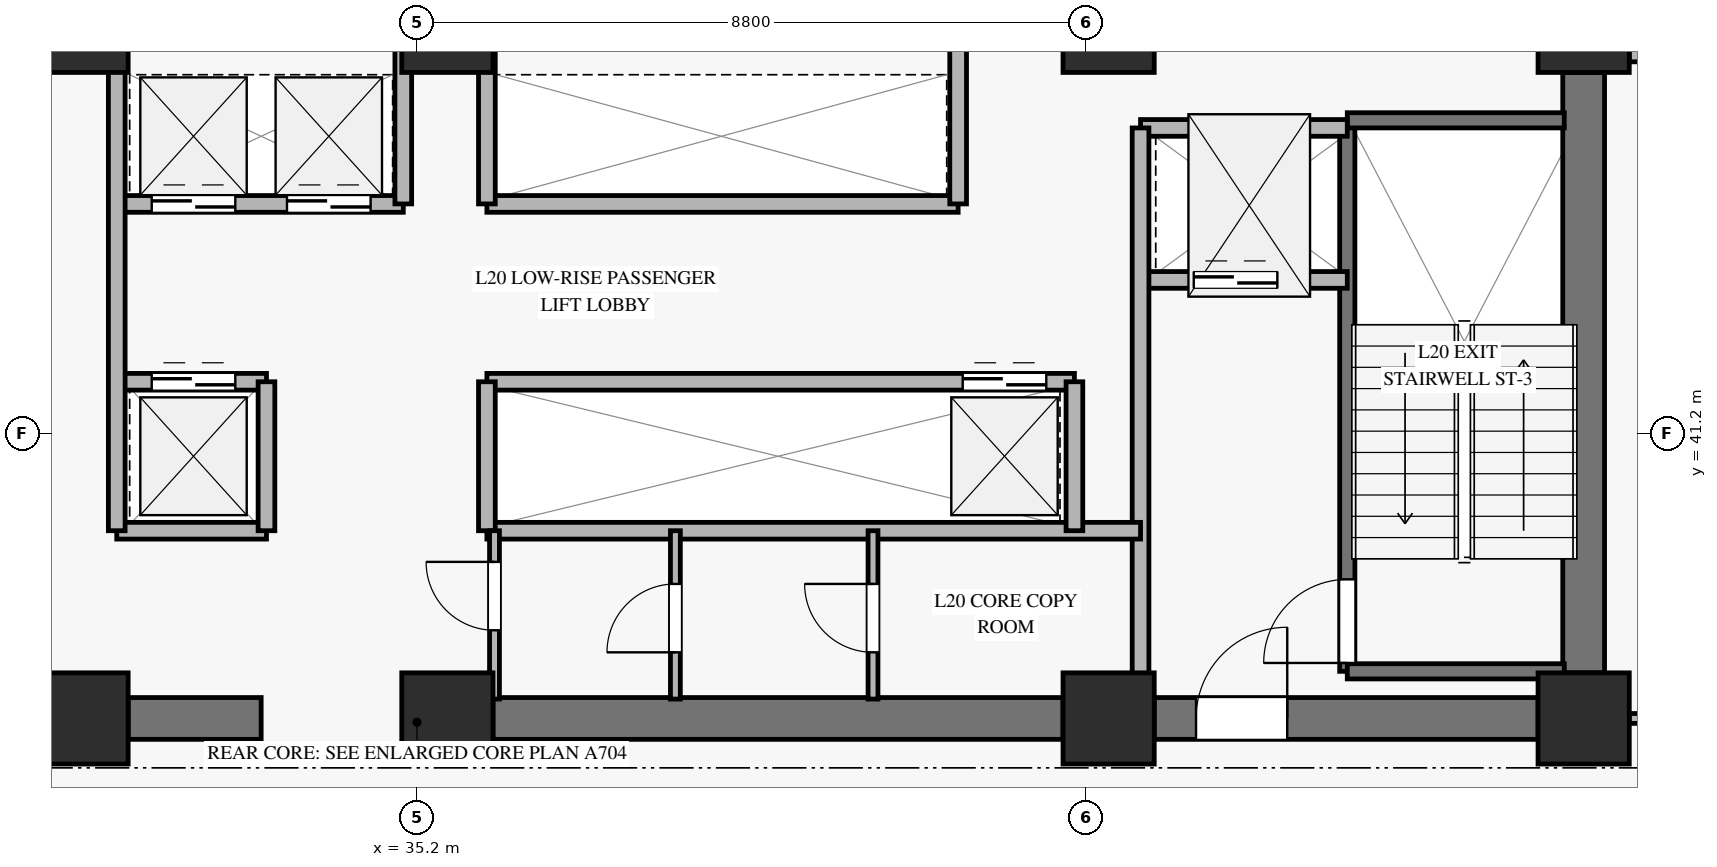
"""IFC4 building model, lengths in metres.
Left out: names, types, materials, properties, quantities, classifications, styles, units other than length and angle.
Written with IfcOpenShell. Run it as: python <this file> out.ifc"""

import sys

from ifc_helpers import new_model, si_unit, direction, frame, frame_2d, origin, origin_2d, place, context, subcontext, project, spatial, rectangle, extrude, source, transform, mapped, element, fill, save


model = new_model("IFC4")
c1 = context("Model", 3, precision=1e-05, world=origin(), true_north=direction((0.0, 1.0)))
c2 = subcontext(c1, "Body", "Model", "MODEL_VIEW")
j1 = project(units=[si_unit("LENGTHUNIT", "METRE"), si_unit("PLANEANGLEUNIT", "RADIAN")], contexts=[c1])
p1 = place(None, origin())
s1 = spatial("IfcSite", under=j1, at=p1, CompositionType="ELEMENT")
p2 = place(p1, origin())
s2 = spatial("IfcBuilding", under=s1, at=p2, CompositionType="ELEMENT")
p3 = place(p2, frame((0.0, 0.0, 83.5)))
s3 = spatial("IfcBuildingStorey", under=s2, at=p3, CompositionType="ELEMENT", Elevation=83.5)
m1 = source(origin(), c2, "Body", "SweptSolid", [
    extrude(rectangle(XDim=1.2, YDim=1.2, at=origin_2d()), origin(), (0.0, 0.0, 1.0), 3.68),
])
for number, where, z_axis, x_axis in (
    (1, (30.8, 37.45, 0.0), (0.0, 0.0, 1.0), (1.0, 0.0, 0.0)),
    (2, (30.8, 46.55, 0.0), (0.0, 0.0, 1.0), (1.0, 0.0, 0.0)),
    (3, (35.6, 37.45, 0.0), (0.0, 0.0, 1.0), (1.0, 0.0, 0.0)),
    (4, (35.6, 46.55, 0.0), (0.0, 0.0, 1.0), (1.0, 0.0, 0.0)),
    (5, (44.3, 37.45, 0.0), (0.0, 0.0, 1.0), (1.0, 0.0, 0.0)),
    (6, (44.3, 46.55, 0.0), (0.0, 0.0, 1.0), (1.0, 0.0, 0.0)),
    (7, (50.55, 37.45, 0.0), (0.0, 0.0, 1.0), (1.0, 0.0, 0.0)),
    (8, (50.55, 46.55, 0.0), (0.0, 0.0, 1.0), (1.0, 0.0, 0.0)),
):
    element("IfcColumn", number, at=place(p3, frame(where, z_axis=z_axis, x_axis=x_axis)), inside=s3, PredefinedType="PILASTER", context=c2, shape_type="MappedRepresentation", body=[
        mapped(m1, transform((0.0, 0.0, 0.0), x_axis=(1.0, 0.0, 0.0), y_axis=(0.0, 1.0, 0.0), z_axis=(0.0, 0.0, 1.0), scale=1.0)),
    ])
p4 = place(p3, frame((31.4, 37.45, 0.0), z_axis=(0.0, 0.0, 1.0), x_axis=(1.0, 0.0, 0.0)))
e9 = element("IfcWall", 9, at=p4, inside=s3, PredefinedType="SHEAR", context=c2, shape_type="SweptSolid", body=[
    extrude(rectangle(XDim=1.75, YDim=0.55, at=frame_2d((0.875, 0.0))), origin(), (0.0, 0.0, 1.0), 3.68),
])
p5 = place(p3, frame((36.2, 37.45, 0.0), z_axis=(0.0, 0.0, 1.0), x_axis=(1.0, 0.0, 0.0)))
e10 = element("IfcWall", 10, at=p5, inside=s3, PredefinedType="SHEAR", context=c2, shape_type="SweptSolid", body=[
    extrude(rectangle(XDim=7.5, YDim=0.55, at=frame_2d((3.75, 0.0))), origin(), (0.0, 0.0, 1.0), 3.68),
])
p6 = place(p3, frame((44.9, 37.45, 0.0), z_axis=(0.0, 0.0, 1.0), x_axis=(1.0, 0.0, 0.0)))
e11 = element("IfcWall", 11, at=p6, inside=s3, PredefinedType="SHEAR", context=c2, shape_type="SweptSolid", body=[
    extrude(rectangle(XDim=5.05, YDim=0.55, at=frame_2d((2.525, 0.0))), origin(), (0.0, 0.0, 1.0), 3.68),
])
p7 = place(p6, frame((0.55, 0.0, 0.0)))
e12 = element("IfcOpeningElement", 12, at=p7, cuts=e11, PredefinedType="OPENING", context=c2, shape_type="SweptSolid", body=[
    extrude(rectangle(XDim=1.2, YDim=2.15, at=frame_2d((0.6, 1.075))), frame((0.0, 0.285, 0.0), z_axis=(0.0, -1.0, 0.0), x_axis=(1.0, 0.0, 0.0)), (0.0, 0.0, 1.0), 0.57),
])
p8 = place(p3, frame((50.55, 38.05, 0.0), z_axis=(0.0, 0.0, 1.0), x_axis=(0.0, 1.0, 0.0)))
e13 = element("IfcWall", 13, at=p8, inside=s3, PredefinedType="SHEAR", context=c2, shape_type="SweptSolid", body=[
    extrude(rectangle(XDim=7.9, YDim=0.55, at=frame_2d((3.95, 0.0))), origin(), (0.0, 0.0, 1.0), 3.68),
])
p9 = place(p3, frame((51.15, 46.25, 0.0), z_axis=(0.0, 0.0, 1.0), x_axis=(1.0, 0.0, 0.0)))
e14 = element("IfcWall", 14, at=p9, inside=s3, PredefinedType="SOLIDWALL", context=c2, shape_type="SweptSolid", body=[
    extrude(rectangle(XDim=11.615, YDim=0.32, at=frame_2d((5.808, 0.0))), origin(), (0.0, 0.0, 1.0), 3.16),
])
p10 = place(p9, frame((5.008, 0.0, 0.45)))
e15 = element("IfcOpeningElement", 15, at=p10, cuts=e14, PredefinedType="OPENING", context=c2, shape_type="SweptSolid", body=[
    extrude(rectangle(XDim=1.6, YDim=2.0, at=frame_2d((0.8, 1.0))), frame((0.0, 0.17, 0.0), z_axis=(0.0, -1.0, 0.0), x_axis=(1.0, 0.0, 0.0)), (0.0, 0.0, 1.0), 0.34),
])
p11 = place(p3, frame((47.44, 38.07, 0.0), z_axis=(0.0, 0.0, 1.0), x_axis=(0.0, 1.0, 0.0)))
e16 = element("IfcWall", 16, at=p11, inside=s3, PredefinedType="SOLIDWALL", context=c2, shape_type="SweptSolid", body=[
    extrude(rectangle(XDim=7.25, YDim=0.2, at=frame_2d((3.625, 0.0))), origin(), (0.0, 0.0, 1.0), 3.9),
])
p12 = place(p11, frame((0.11, 0.0, 0.0)))
e17 = element("IfcOpeningElement", 17, at=p12, cuts=e16, PredefinedType="OPENING", context=c2, shape_type="SweptSolid", body=[
    extrude(rectangle(XDim=1.1, YDim=2.15, at=frame_2d((0.55, 1.075))), frame((0.0, 0.11, 0.0), z_axis=(0.0, -1.0, 0.0), x_axis=(1.0, 0.0, 0.0)), (0.0, 0.0, 1.0), 0.22),
])
for number, where, z_axis, x_axis in (
    (18, (47.44, 45.32, 0.0), (0.0, 0.0, 1.0), (1.0, 0.0, 0.0)),
    (19, (47.44, 38.07, 0.0), (0.0, 0.0, 1.0), (1.0, 0.0, 0.0)),
):
    element("IfcWall", number, at=place(p3, frame(where, z_axis=z_axis, x_axis=x_axis)), inside=s3, PredefinedType="SOLIDWALL", context=c2, shape_type="SweptSolid", body=[
        extrude(rectangle(XDim=2.855, YDim=0.2, at=frame_2d((1.427, 0.0))), origin(), (0.0, 0.0, 1.0), 3.9),
    ])
p13 = place(p3, frame((44.72, 43.22, 0.0), z_axis=(0.0, 0.0, 1.0), x_axis=(1.0, 0.0, 0.0)))
e20 = element("IfcWall", 20, at=p13, inside=s3, PredefinedType="SOLIDWALL", context=c2, shape_type="SweptSolid", body=[
    extrude(rectangle(XDim=2.72, YDim=0.22, at=frame_2d((1.36, 0.0))), origin(), (0.0, 0.0, 1.0), 3.68),
])
p14 = place(p13, frame((0.7, 0.0, 0.0)))
e21 = element("IfcOpeningElement", 21, at=p14, cuts=e20, PredefinedType="OPENING", context=c2, shape_type="SweptSolid", body=[
    extrude(rectangle(XDim=1.1, YDim=2.2, at=frame_2d((0.55, 1.1))), frame((0.0, 0.12, 0.0), z_axis=(0.0, -1.0, 0.0), x_axis=(1.0, 0.0, 0.0)), (0.0, 0.0, 1.0), 0.24),
])
p15 = place(p3, frame((44.72, 45.22, 0.0), z_axis=(0.0, 0.0, 1.0), x_axis=(1.0, 0.0, 0.0)))
e22 = element("IfcWall", 22, at=p15, inside=s3, PredefinedType="SOLIDWALL", context=c2, shape_type="SweptSolid", body=[
    extrude(rectangle(XDim=2.72, YDim=0.22, at=frame_2d((1.36, 0.0))), origin(), (0.0, 0.0, 1.0), 3.68),
])
p16 = place(p3, frame((44.72, 37.705, 0.0), z_axis=(0.0, 0.0, 1.0), x_axis=(0.0, 1.0, 0.0)))
e23 = element("IfcWall", 23, at=p16, inside=s3, PredefinedType="SOLIDWALL", context=c2, shape_type="SweptSolid", body=[
    extrude(rectangle(XDim=7.515, YDim=0.22, at=frame_2d((3.757, 0.0))), origin(), (0.0, 0.0, 1.0), 3.68),
])
p17 = place(p3, frame((31.25, 44.22, 0.0), z_axis=(0.0, 0.0, 1.0), x_axis=(1.0, 0.0, 0.0)))
e24 = element("IfcWall", 24, at=p17, inside=s3, PredefinedType="SOLIDWALL", context=c2, shape_type="SweptSolid", body=[
    extrude(rectangle(XDim=3.77, YDim=0.22, at=frame_2d((1.885, 0.0))), origin(), (0.0, 0.0, 1.0), 3.68),
])
p18 = place(p17, frame((0.46, 0.0, 0.0)))
e25 = element("IfcOpeningElement", 25, at=p18, cuts=e24, PredefinedType="OPENING", context=c2, shape_type="SweptSolid", body=[
    extrude(rectangle(XDim=1.1, YDim=2.2, at=frame_2d((0.55, 1.1))), frame((0.0, 0.12, 0.0), z_axis=(0.0, -1.0, 0.0), x_axis=(1.0, 0.0, 0.0)), (0.0, 0.0, 1.0), 0.24),
])
p19 = place(p17, frame((2.24, 0.0, 0.0)))
e26 = element("IfcOpeningElement", 26, at=p19, cuts=e24, PredefinedType="OPENING", context=c2, shape_type="SweptSolid", body=[
    extrude(rectangle(XDim=1.1, YDim=2.2, at=frame_2d((0.55, 1.1))), frame((0.0, 0.12, 0.0), z_axis=(0.0, -1.0, 0.0), x_axis=(1.0, 0.0, 0.0)), (0.0, 0.0, 1.0), 0.24),
])
p20 = place(p3, frame((36.12, 44.22, 0.0), z_axis=(0.0, 0.0, 1.0), x_axis=(1.0, 0.0, 0.0)))
e27 = element("IfcWall", 27, at=p20, inside=s3, PredefinedType="SOLIDWALL", context=c2, shape_type="SweptSolid", body=[
    extrude(rectangle(XDim=6.2, YDim=0.22, at=frame_2d((3.1, 0.0))), origin(), (0.0, 0.0, 1.0), 3.68),
])
for number, where, z_axis, x_axis in (
    (28, (35.02, 44.22, 0.0), (0.0, 0.0, 1.0), (0.0, 1.0, 0.0)),
    (29, (36.12, 44.22, 0.0), (0.0, 0.0, 1.0), (0.0, 1.0, 0.0)),
    (30, (42.32, 44.22, 0.0), (0.0, 0.0, 1.0), (0.0, 1.0, 0.0)),
):
    element("IfcWall", number, at=place(p3, frame(where, z_axis=z_axis, x_axis=x_axis)), inside=s3, PredefinedType="SOLIDWALL", context=c2, shape_type="SweptSolid", body=[
        extrude(rectangle(XDim=2.075, YDim=0.22, at=frame_2d((1.038, 0.0))), origin(), (0.0, 0.0, 1.0), 3.68),
    ])
p21 = place(p3, frame((31.25, 41.88, 0.0), z_axis=(0.0, 0.0, 1.0), x_axis=(1.0, 0.0, 0.0)))
e31 = element("IfcWall", 31, at=p21, inside=s3, PredefinedType="SOLIDWALL", context=c2, shape_type="SweptSolid", body=[
    extrude(rectangle(XDim=1.97, YDim=0.22, at=frame_2d((0.985, 0.0))), origin(), (0.0, 0.0, 1.0), 3.68),
])
p22 = place(p21, frame((0.46, 0.0, 0.0)))
e32 = element("IfcOpeningElement", 32, at=p22, cuts=e31, PredefinedType="OPENING", context=c2, shape_type="SweptSolid", body=[
    extrude(rectangle(XDim=1.1, YDim=2.2, at=frame_2d((0.55, 1.1))), frame((0.0, 0.12, 0.0), z_axis=(0.0, -1.0, 0.0), x_axis=(1.0, 0.0, 0.0)), (0.0, 0.0, 1.0), 0.24),
])
p23 = place(p3, frame((36.12, 41.88, 0.0), z_axis=(0.0, 0.0, 1.0), x_axis=(1.0, 0.0, 0.0)))
e33 = element("IfcWall", 33, at=p23, inside=s3, PredefinedType="SOLIDWALL", context=c2, shape_type="SweptSolid", body=[
    extrude(rectangle(XDim=7.73, YDim=0.22, at=frame_2d((3.865, 0.0))), origin(), (0.0, 0.0, 1.0), 3.68),
])
p24 = place(p23, frame((6.26, 0.0, 0.0)))
e34 = element("IfcOpeningElement", 34, at=p24, cuts=e33, PredefinedType="OPENING", context=c2, shape_type="SweptSolid", body=[
    extrude(rectangle(XDim=1.1, YDim=2.2, at=frame_2d((0.55, 1.1))), frame((0.0, 0.12, 0.0), z_axis=(0.0, -1.0, 0.0), x_axis=(1.0, 0.0, 0.0)), (0.0, 0.0, 1.0), 0.24),
])
p25 = place(p3, frame((31.25, 39.92, 0.0), z_axis=(0.0, 0.0, 1.0), x_axis=(1.0, 0.0, 0.0)))
e35 = element("IfcWall", 35, at=p25, inside=s3, PredefinedType="SOLIDWALL", context=c2, shape_type="SweptSolid", body=[
    extrude(rectangle(XDim=1.97, YDim=0.22, at=frame_2d((0.985, 0.0))), origin(), (0.0, 0.0, 1.0), 3.68),
])
p26 = place(p3, frame((33.22, 39.92, 0.0), z_axis=(0.0, 0.0, 1.0), x_axis=(0.0, 1.0, 0.0)))
e36 = element("IfcWall", 36, at=p26, inside=s3, PredefinedType="SOLIDWALL", context=c2, shape_type="SweptSolid", body=[
    extrude(rectangle(XDim=1.96, YDim=0.22, at=frame_2d((0.98, 0.0))), origin(), (0.0, 0.0, 1.0), 3.68),
])
p27 = place(p3, frame((36.12, 39.92, 0.0), z_axis=(0.0, 0.0, 1.0), x_axis=(1.0, 0.0, 0.0)))
e37 = element("IfcWall", 37, at=p27, inside=s3, PredefinedType="SOLIDWALL", context=c2, shape_type="SweptSolid", body=[
    extrude(rectangle(XDim=8.6, YDim=0.22, at=frame_2d((4.3, 0.0))), origin(), (0.0, 0.0, 1.0), 2.965),
])
p28 = place(p3, frame((36.12, 39.92, 0.0), z_axis=(0.0, 0.0, 1.0), x_axis=(0.0, 1.0, 0.0)))
e38 = element("IfcWall", 38, at=p28, inside=s3, PredefinedType="SOLIDWALL", context=c2, shape_type="SweptSolid", body=[
    extrude(rectangle(XDim=1.96, YDim=0.22, at=frame_2d((0.98, 0.0))), origin(), (0.0, 0.0, 1.0), 3.68),
])
p29 = place(p3, frame((31.25, 39.92, 0.0), z_axis=(0.0, 0.0, 1.0), x_axis=(0.0, 1.0, 0.0)))
e39 = element("IfcWall", 39, at=p29, inside=s3, PredefinedType="SOLIDWALL", context=c2, shape_type="SweptSolid", body=[
    extrude(rectangle(XDim=6.375, YDim=0.22, at=frame_2d((3.188, 0.0))), origin(), (0.0, 0.0, 1.0), 3.68),
])
p30 = place(p3, frame((43.85, 39.92, 0.0), z_axis=(0.0, 0.0, 1.0), x_axis=(0.0, 1.0, 0.0)))
e40 = element("IfcWall", 40, at=p30, inside=s3, PredefinedType="SOLIDWALL", context=c2, shape_type="SweptSolid", body=[
    extrude(rectangle(XDim=1.96, YDim=0.22, at=frame_2d((0.98, 0.0))), origin(), (0.0, 0.0, 1.0), 3.68),
])
p31 = place(p3, frame((36.22, 37.705, 0.0), z_axis=(0.0, 0.0, 1.0), x_axis=(0.0, 1.0, 0.0)))
e41 = element("IfcWall", 41, at=p31, inside=s3, PredefinedType="PARTITIONING", context=c2, shape_type="SweptSolid", body=[
    extrude(rectangle(XDim=2.215, YDim=0.13, at=frame_2d((1.107, 0.0))), origin(), (0.0, 0.0, 1.0), 3.68),
])
p32 = place(p31, frame((0.905, 0.0, 0.0)))
e42 = element("IfcOpeningElement", 42, at=p32, cuts=e41, PredefinedType="OPENING", context=c2, shape_type="SweptSolid", body=[
    extrude(rectangle(XDim=0.9, YDim=2.1, at=frame_2d((0.45, 1.05))), frame((0.0, 0.075, 0.0), z_axis=(0.0, -1.0, 0.0), x_axis=(1.0, 0.0, 0.0)), (0.0, 0.0, 1.0), 0.15),
])
p33 = place(p3, frame((38.6, 37.705, 0.0), z_axis=(0.0, 0.0, 1.0), x_axis=(0.0, 1.0, 0.0)))
e43 = element("IfcWall", 43, at=p33, inside=s3, PredefinedType="PARTITIONING", context=c2, shape_type="SweptSolid", body=[
    extrude(rectangle(XDim=2.215, YDim=0.13, at=frame_2d((1.107, 0.0))), origin(), (0.0, 0.0, 1.0), 3.68),
])
p34 = place(p33, frame((0.615, 0.0, 0.0)))
e44 = element("IfcOpeningElement", 44, at=p34, cuts=e43, PredefinedType="OPENING", context=c2, shape_type="SweptSolid", body=[
    extrude(rectangle(XDim=0.9, YDim=2.1, at=frame_2d((0.45, 1.05))), frame((0.0, 0.075, 0.0), z_axis=(0.0, -1.0, 0.0), x_axis=(1.0, 0.0, 0.0)), (0.0, 0.0, 1.0), 0.15),
])
p35 = place(p3, frame((41.2, 37.705, 0.0), z_axis=(0.0, 0.0, 1.0), x_axis=(0.0, 1.0, 0.0)))
e45 = element("IfcWall", 45, at=p35, inside=s3, PredefinedType="PARTITIONING", context=c2, shape_type="SweptSolid", body=[
    extrude(rectangle(XDim=2.215, YDim=0.13, at=frame_2d((1.107, 0.0))), origin(), (0.0, 0.0, 1.0), 3.68),
])
p36 = place(p35, frame((0.615, 0.0, 0.0)))
e46 = element("IfcOpeningElement", 46, at=p36, cuts=e45, PredefinedType="OPENING", context=c2, shape_type="SweptSolid", body=[
    extrude(rectangle(XDim=0.9, YDim=2.1, at=frame_2d((0.45, 1.05))), frame((0.0, 0.075, 0.0), z_axis=(0.0, -1.0, 0.0), x_axis=(1.0, 0.0, 0.0)), (0.0, 0.0, 1.0), 0.15),
])
p37 = place(p3, frame((51.15, 37.45, 0.0), z_axis=(0.0, 0.0, 1.0), x_axis=(1.0, 0.0, 0.0)))
e47 = element("IfcWall", 47, at=p37, inside=s3, PredefinedType="PARTITIONING", context=c2, shape_type="SweptSolid", body=[
    extrude(rectangle(XDim=15.211, YDim=0.13, at=frame_2d((7.605, 0.0))), origin(), (0.0, 0.0, 1.0), 3.165),
])
p38 = place(p37, frame((0.5, 0.0, 0.0)))
e48 = element("IfcOpeningElement", 48, at=p38, cuts=e47, PredefinedType="OPENING", context=c2, shape_type="SweptSolid", body=[
    extrude(rectangle(XDim=0.9, YDim=2.1, at=frame_2d((0.45, 1.05))), frame((0.0, 0.075, 0.0), z_axis=(0.0, -1.0, 0.0), x_axis=(1.0, 0.0, 0.0)), (0.0, 0.0, 1.0), 0.15),
])
p39 = place(p37, frame((10.923, 0.0, 0.0)))
e49 = element("IfcOpeningElement", 49, at=p39, cuts=e47, PredefinedType="OPENING", context=c2, shape_type="SweptSolid", body=[
    extrude(rectangle(XDim=0.95, YDim=2.1, at=frame_2d((0.475, 1.05))), frame((0.0, 0.075, 0.0), z_axis=(0.0, -1.0, 0.0), x_axis=(1.0, 0.0, 0.0)), (0.0, 0.0, 1.0), 0.15),
])
m2 = source(origin(), c2, "Body", "SweptSolid", [
    extrude(rectangle(XDim=1.1, YDim=2.15, at=frame_2d((0.55, 1.075))), frame((0.0, 0.025, 0.0), z_axis=(0.0, -1.0, 0.0), x_axis=(1.0, 0.0, 0.0)), (0.0, 0.0, 1.0), 0.05),
])
p40 = place(p12, origin())
e50 = element("IfcDoor", 50, at=p40, inside=s3, OperationType="SINGLE_SWING_LEFT", PredefinedType="DOOR", context=c2, shape_type="MappedRepresentation", body=[
    mapped(m2, transform((0.0, 0.0, 0.0), x_axis=(1.0, 0.0, 0.0), y_axis=(0.0, 1.0, 0.0), z_axis=(0.0, 0.0, 1.0), scale=1.0)),
])
fill(e17, e50)
m3 = source(origin(), c2, "Body", "SweptSolid", [
    extrude(rectangle(XDim=1.1, YDim=2.2, at=frame_2d((0.55, 1.1))), frame((0.0, 0.025, 0.0), z_axis=(0.0, -1.0, 0.0), x_axis=(1.0, 0.0, 0.0)), (0.0, 0.0, 1.0), 0.05),
])
p41 = place(p14, origin())
e51 = element("IfcDoor", 51, at=p41, inside=s3, OperationType="SLIDING_TO_LEFT", PredefinedType="DOOR", context=c2, shape_type="MappedRepresentation", body=[
    mapped(m3, transform((0.0, 0.0, 0.0), x_axis=(1.0, 0.0, 0.0), y_axis=(0.0, 1.0, 0.0), z_axis=(0.0, 0.0, 1.0), scale=1.0)),
])
fill(e21, e51)
m4 = source(origin(), c2, "Body", "SweptSolid", [
    extrude(rectangle(XDim=1.2, YDim=2.15, at=frame_2d((0.6, 1.075))), frame((0.0, 0.025, 0.0), z_axis=(0.0, -1.0, 0.0), x_axis=(1.0, 0.0, 0.0)), (0.0, 0.0, 1.0), 0.05),
])
p42 = place(p7, origin())
e52 = element("IfcDoor", 52, at=p42, inside=s3, OperationType="SINGLE_SWING_RIGHT", PredefinedType="DOOR", context=c2, shape_type="MappedRepresentation", body=[
    mapped(m4, transform((0.0, 0.0, 0.0), x_axis=(1.0, 0.0, 0.0), y_axis=(0.0, 1.0, 0.0), z_axis=(0.0, 0.0, 1.0), scale=1.0)),
])
fill(e12, e52)
p43 = place(p18, origin())
e53 = element("IfcDoor", 53, at=p43, inside=s3, OperationType="SLIDING_TO_LEFT", PredefinedType="DOOR", context=c2, shape_type="MappedRepresentation", body=[
    mapped(m3, transform((0.0, 0.0, 0.0), x_axis=(1.0, 0.0, 0.0), y_axis=(0.0, 1.0, 0.0), z_axis=(0.0, 0.0, 1.0), scale=1.0)),
])
fill(e25, e53)
p44 = place(p19, origin())
e54 = element("IfcDoor", 54, at=p44, inside=s3, OperationType="SLIDING_TO_LEFT", PredefinedType="DOOR", context=c2, shape_type="MappedRepresentation", body=[
    mapped(m3, transform((0.0, 0.0, 0.0), x_axis=(1.0, 0.0, 0.0), y_axis=(0.0, 1.0, 0.0), z_axis=(0.0, 0.0, 1.0), scale=1.0)),
])
fill(e26, e54)
p45 = place(p22, origin())
e55 = element("IfcDoor", 55, at=p45, inside=s3, OperationType="SLIDING_TO_LEFT", PredefinedType="DOOR", context=c2, shape_type="MappedRepresentation", body=[
    mapped(m3, transform((0.0, 0.0, 0.0), x_axis=(1.0, 0.0, 0.0), y_axis=(0.0, 1.0, 0.0), z_axis=(0.0, 0.0, 1.0), scale=1.0)),
])
fill(e32, e55)
p46 = place(p24, origin())
e56 = element("IfcDoor", 56, at=p46, inside=s3, OperationType="SLIDING_TO_LEFT", PredefinedType="DOOR", context=c2, shape_type="MappedRepresentation", body=[
    mapped(m3, transform((0.0, 0.0, 0.0), x_axis=(1.0, 0.0, 0.0), y_axis=(0.0, 1.0, 0.0), z_axis=(0.0, 0.0, 1.0), scale=1.0)),
])
fill(e34, e56)
m5 = source(origin(), c2, "Body", "SweptSolid", [
    extrude(rectangle(XDim=0.9, YDim=2.1, at=frame_2d((0.45, 1.05))), frame((0.0, 0.025, 0.0), z_axis=(0.0, -1.0, 0.0), x_axis=(1.0, 0.0, 0.0)), (0.0, 0.0, 1.0), 0.05),
])
p47 = place(p32, origin())
e57 = element("IfcDoor", 57, at=p47, inside=s3, OperationType="SINGLE_SWING_RIGHT", PredefinedType="DOOR", context=c2, shape_type="MappedRepresentation", body=[
    mapped(m5, transform((0.0, 0.0, 0.0), x_axis=(1.0, 0.0, 0.0), y_axis=(0.0, 1.0, 0.0), z_axis=(0.0, 0.0, 1.0), scale=1.0)),
])
fill(e42, e57)
p48 = place(p34, origin())
e58 = element("IfcDoor", 58, at=p48, inside=s3, OperationType="SINGLE_SWING_LEFT", PredefinedType="DOOR", context=c2, shape_type="MappedRepresentation", body=[
    mapped(m5, transform((0.0, 0.0, 0.0), x_axis=(1.0, 0.0, 0.0), y_axis=(0.0, 1.0, 0.0), z_axis=(0.0, 0.0, 1.0), scale=1.0)),
])
fill(e44, e58)
p49 = place(p36, origin())
e59 = element("IfcDoor", 59, at=p49, inside=s3, OperationType="SINGLE_SWING_RIGHT", PredefinedType="DOOR", context=c2, shape_type="MappedRepresentation", body=[
    mapped(m5, transform((0.0, 0.0, 0.0), x_axis=(1.0, 0.0, 0.0), y_axis=(0.0, 1.0, 0.0), z_axis=(0.0, 0.0, 1.0), scale=1.0)),
])
fill(e46, e59)
save(model, sys.argv[1])
